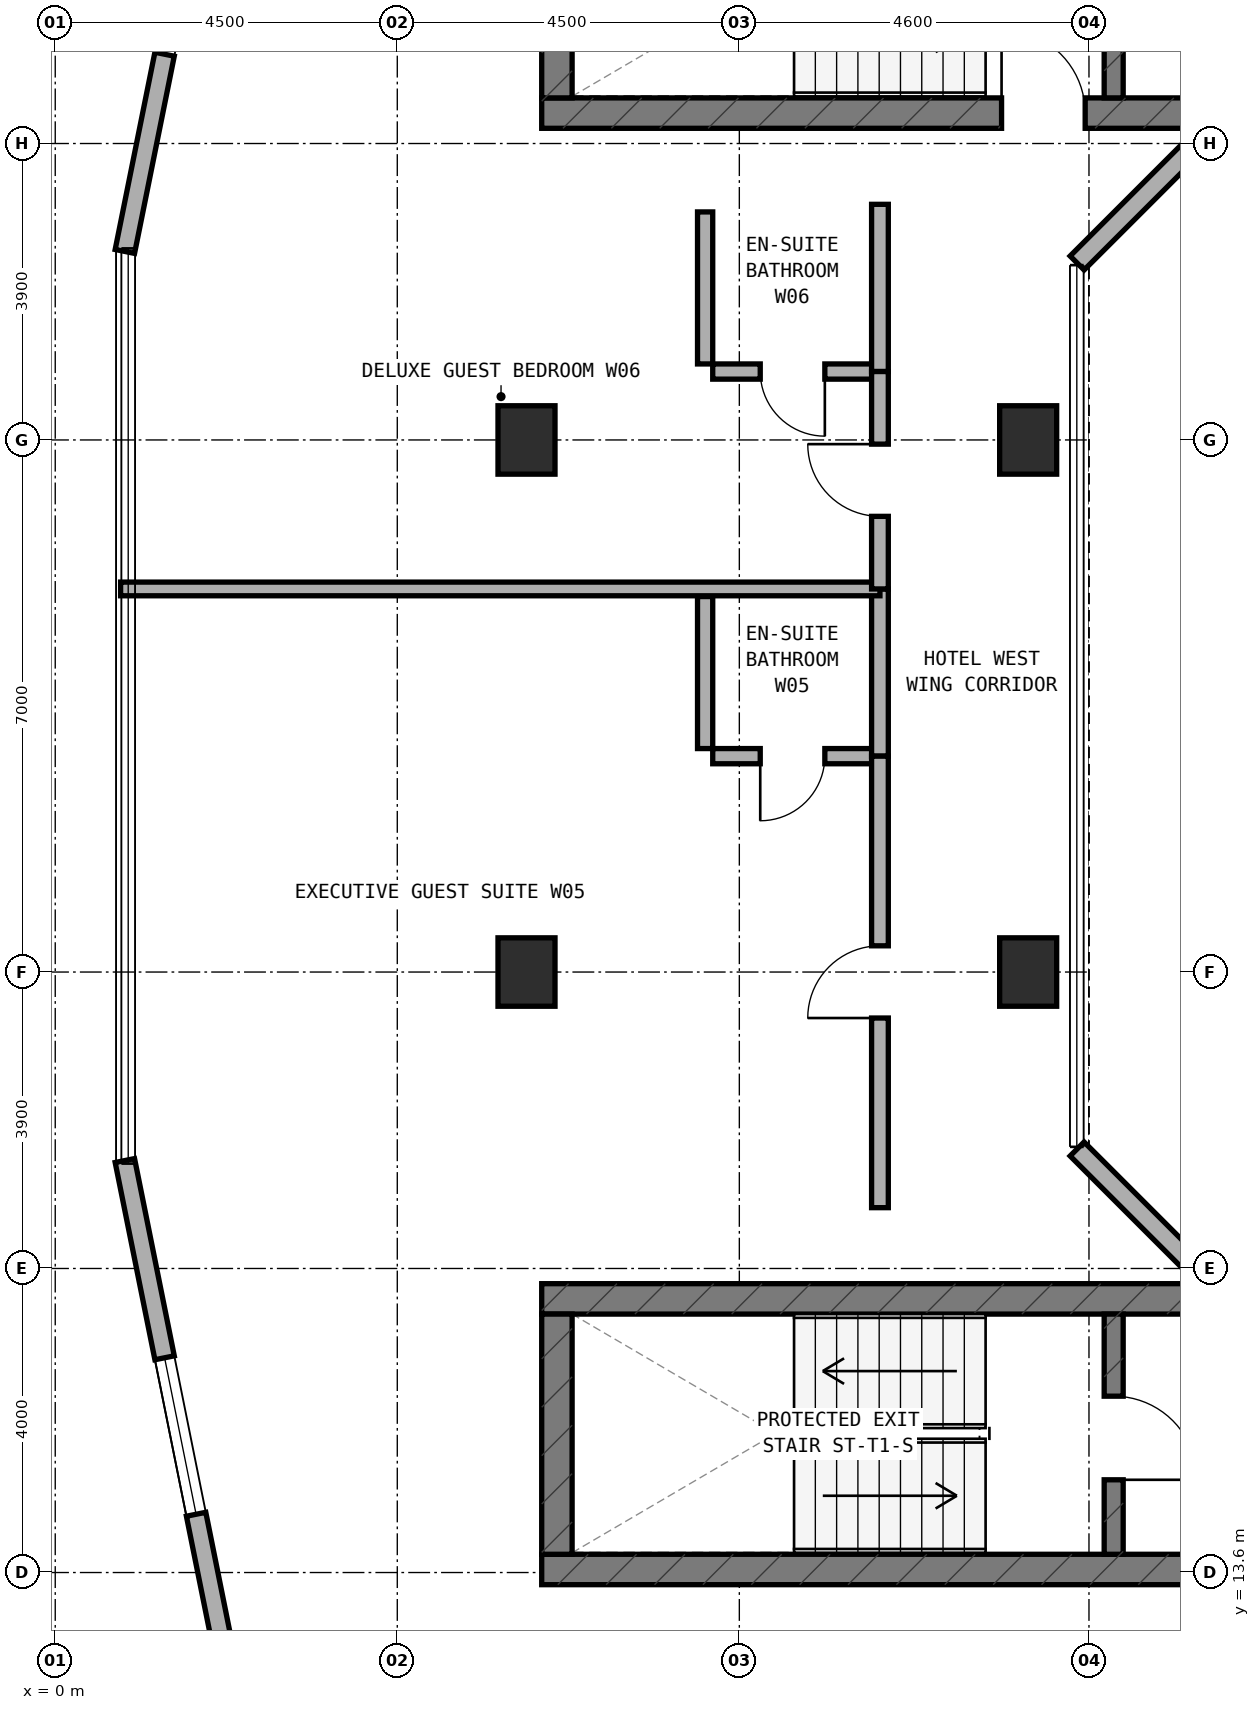
"""IFC4 building model, lengths in metres.
Left out: names, types, materials, properties, quantities, classifications, styles, units other than length and angle.
Written with IfcOpenShell. Run it as: python <this file> out.ifc"""

import sys

from ifc_helpers import new_model, si_unit, direction, frame, frame_2d, origin, origin_2d, place, context, subcontext, project, spatial, rectangle, extrude, element, fill, save


model = new_model("IFC4")
c1 = context("Model", 3, precision=1e-05, world=origin(), true_north=direction((0.0, 1.0)))
c2 = subcontext(c1, "Body", "Model", "MODEL_VIEW")
j1 = project(units=[si_unit("LENGTHUNIT", "METRE"), si_unit("PLANEANGLEUNIT", "RADIAN")], contexts=[c1])
p1 = place(None, origin())
s1 = spatial("IfcSite", under=j1, at=p1, CompositionType="ELEMENT")
p2 = place(p1, origin())
s2 = spatial("IfcBuilding", under=s1, at=p2, CompositionType="ELEMENT")
p3 = place(p2, frame((0.0, 0.0, 169.5)))
s3 = spatial("IfcBuildingStorey", under=s2, at=p3, CompositionType="ELEMENT", Elevation=169.5)
p4 = place(p3, frame((6.4, 32.8, 0.0), z_axis=(0.0, 0.0, 1.0), x_axis=(1.0, 0.0, 0.0)))
e1 = element("IfcWall", 1, at=p4, inside=s3, PredefinedType="SHEAR", context=c2, shape_type="SweptSolid", body=[
    extrude(rectangle(XDim=24.4, YDim=0.4, at=frame_2d((12.2, 0.0))), origin(), (0.0, 0.0, 1.0), 3.5),
])
p5 = place(p4, frame((6.05, 0.0, 0.0)))
e2 = element("IfcOpeningElement", 2, at=p5, cuts=e1, PredefinedType="OPENING", context=c2, shape_type="SweptSolid", body=[
    extrude(rectangle(XDim=1.1, YDim=2.15, at=frame_2d((0.55, 1.075))), frame((0.0, 0.21, 0.0), z_axis=(0.0, -1.0, 0.0), x_axis=(1.0, 0.0, 0.0)), (0.0, 0.0, 1.0), 0.42),
])
p6 = place(p3, frame((6.6, 33.0, 0.0), z_axis=(0.0, 0.0, 1.0), x_axis=(0.0, 1.0, 0.0)))
e3 = element("IfcWall", 3, at=p6, inside=s3, PredefinedType="SHEAR", context=c2, shape_type="SweptSolid", body=[
    extrude(rectangle(XDim=3.16, YDim=0.4, at=frame_2d((1.58, 0.0))), origin(), (0.0, 0.0, 1.0), 3.5),
])
p7 = place(p3, frame((13.925, 33.0, 0.0), z_axis=(0.0, 0.0, 1.0), x_axis=(0.0, 1.0, 0.0)))
e4 = element("IfcWall", 4, at=p7, inside=s3, PredefinedType="STANDARD", context=c2, shape_type="SweptSolid", body=[
    extrude(rectangle(XDim=3.16, YDim=0.25, at=frame_2d((1.58, 0.0))), origin(), (0.0, 0.0, 1.0), 3.18),
])
p8 = place(p7, frame((0.98, 0.0, 0.0)))
e5 = element("IfcOpeningElement", 5, at=p8, cuts=e4, PredefinedType="OPENING", context=c2, shape_type="SweptSolid", body=[
    extrude(rectangle(XDim=1.1, YDim=2.15, at=frame_2d((0.55, 1.075))), frame((0.0, 0.135, 0.0), z_axis=(0.0, -1.0, 0.0), x_axis=(1.0, 0.0, 0.0)), (0.0, 0.0, 1.0), 0.27),
])
p9 = place(p3, frame((6.4, 13.64, 0.0), z_axis=(0.0, 0.0, 1.0), x_axis=(1.0, 0.0, 0.0)))
e6 = element("IfcWall", 6, at=p9, inside=s3, PredefinedType="SHEAR", context=c2, shape_type="SweptSolid", body=[
    extrude(rectangle(XDim=24.4, YDim=0.4, at=frame_2d((12.2, 0.0))), origin(), (0.0, 0.0, 1.0), 3.5),
])
p10 = place(p9, frame((9.15, 0.0, 0.0)))
e7 = element("IfcOpeningElement", 7, at=p10, cuts=e6, PredefinedType="OPENING", context=c2, shape_type="SweptSolid", body=[
    extrude(rectangle(XDim=1.2, YDim=2.15, at=frame_2d((0.6, 1.075))), frame((0.0, 0.21, 0.0), z_axis=(0.0, -1.0, 0.0), x_axis=(1.0, 0.0, 0.0)), (0.0, 0.0, 1.0), 0.42),
])
p11 = place(p9, frame((16.94, 0.0, 0.0)))
e8 = element("IfcOpeningElement", 8, at=p11, cuts=e6, PredefinedType="OPENING", context=c2, shape_type="SweptSolid", body=[
    extrude(rectangle(XDim=0.85, YDim=2.1, at=frame_2d((0.425, 1.05))), frame((0.0, 0.21, 0.0), z_axis=(0.0, -1.0, 0.0), x_axis=(1.0, 0.0, 0.0)), (0.0, 0.0, 1.0), 0.42),
])
p12 = place(p9, frame((18.783, 0.0, 0.0)))
e9 = element("IfcOpeningElement", 9, at=p12, cuts=e6, PredefinedType="OPENING", context=c2, shape_type="SweptSolid", body=[
    extrude(rectangle(XDim=1.1, YDim=2.15, at=frame_2d((0.55, 1.075))), frame((0.0, 0.21, 0.0), z_axis=(0.0, -1.0, 0.0), x_axis=(1.0, 0.0, 0.0)), (0.0, 0.0, 1.0), 0.42),
])
p13 = place(p9, frame((20.65, 0.0, 0.0)))
e10 = element("IfcOpeningElement", 10, at=p13, cuts=e6, PredefinedType="OPENING", context=c2, shape_type="SweptSolid", body=[
    extrude(rectangle(XDim=1.1, YDim=2.15, at=frame_2d((0.55, 1.075))), frame((0.0, 0.21, 0.0), z_axis=(0.0, -1.0, 0.0), x_axis=(1.0, 0.0, 0.0)), (0.0, 0.0, 1.0), 0.42),
])
p14 = place(p9, frame((22.517, 0.0, 0.0)))
e11 = element("IfcOpeningElement", 11, at=p14, cuts=e6, PredefinedType="OPENING", context=c2, shape_type="SweptSolid", body=[
    extrude(rectangle(XDim=1.1, YDim=2.15, at=frame_2d((0.55, 1.075))), frame((0.0, 0.21, 0.0), z_axis=(0.0, -1.0, 0.0), x_axis=(1.0, 0.0, 0.0)), (0.0, 0.0, 1.0), 0.42),
])
p15 = place(p3, frame((6.4, 17.2, 0.0), z_axis=(0.0, 0.0, 1.0), x_axis=(1.0, 0.0, 0.0)))
e12 = element("IfcWall", 12, at=p15, inside=s3, PredefinedType="SHEAR", context=c2, shape_type="SweptSolid", body=[
    extrude(rectangle(XDim=24.4, YDim=0.4, at=frame_2d((12.2, 0.0))), origin(), (0.0, 0.0, 1.0), 3.5),
])
p16 = place(p3, frame((6.6, 13.84, 0.0), z_axis=(0.0, 0.0, 1.0), x_axis=(0.0, 1.0, 0.0)))
e13 = element("IfcWall", 13, at=p16, inside=s3, PredefinedType="SHEAR", context=c2, shape_type="SweptSolid", body=[
    extrude(rectangle(XDim=3.16, YDim=0.4, at=frame_2d((1.58, 0.0))), origin(), (0.0, 0.0, 1.0), 3.5),
])
p17 = place(p3, frame((13.925, 13.84, 0.0), z_axis=(0.0, 0.0, 1.0), x_axis=(0.0, 1.0, 0.0)))
e14 = element("IfcWall", 14, at=p17, inside=s3, PredefinedType="STANDARD", context=c2, shape_type="SweptSolid", body=[
    extrude(rectangle(XDim=3.16, YDim=0.25, at=frame_2d((1.58, 0.0))), origin(), (0.0, 0.0, 1.0), 3.18),
])
p18 = place(p17, frame((0.98, 0.0, 0.0)))
e15 = element("IfcOpeningElement", 15, at=p18, cuts=e14, PredefinedType="OPENING", context=c2, shape_type="SweptSolid", body=[
    extrude(rectangle(XDim=1.1, YDim=2.15, at=frame_2d((0.55, 1.075))), frame((0.0, 0.135, 0.0), z_axis=(0.0, -1.0, 0.0), x_axis=(1.0, 0.0, 0.0)), (0.0, 0.0, 1.0), 0.27),
])
for number, where, z_axis, x_axis in (
    (16, (6.2, 21.5, 0.0), (0.0, 0.0, 1.0), (1.0, 0.0, 0.0)),
    (17, (6.2, 28.5, 0.0), (0.0, 0.0, 1.0), (1.0, 0.0, 0.0)),
    (18, (12.8, 21.5, 0.0), (0.0, 0.0, 1.0), (1.0, 0.0, 0.0)),
    (19, (12.8, 28.5, 0.0), (0.0, 0.0, 1.0), (1.0, 0.0, 0.0)),
):
    element("IfcColumn", number, at=place(p3, frame(where, z_axis=z_axis, x_axis=x_axis)), inside=s3, PredefinedType="COLUMN", context=c2, shape_type="SweptSolid", body=[
        extrude(rectangle(XDim=0.75, YDim=0.9, at=origin_2d()), origin(), (0.0, 0.0, 1.0), 3.5),
    ])
p19 = place(p3, frame((2.729, 39.982, 0.0), z_axis=(0.0, 0.0, 1.0), x_axis=(-0.197435082048, -0.980315963543, 0.0)))
e20 = element("IfcWall", 20, at=p19, inside=s3, PredefinedType="STANDARD", context=c2, shape_type="SweptSolid", body=[
    extrude(rectangle(XDim=9.183, YDim=0.26, at=frame_2d((4.591, 0.0))), origin(), (0.0, 0.0, 1.0), 3.18),
])
p20 = place(p19, frame((4.436, 0.0, 0.85)))
e21 = element("IfcOpeningElement", 21, at=p20, cuts=e20, PredefinedType="OPENING", context=c2, shape_type="SweptSolid", body=[
    extrude(rectangle(XDim=2.1, YDim=1.5, at=frame_2d((1.05, 0.75))), frame((0.0, 0.14, 0.0), z_axis=(0.0, -1.0, 0.0), x_axis=(1.0, 0.0, 0.0)), (0.0, 0.0, 1.0), 0.28),
])
p21 = place(p3, frame((0.916, 19.02, 0.0), z_axis=(0.0, 0.0, 1.0), x_axis=(0.197435082048, -0.980315963543, 0.0)))
e22 = element("IfcWall", 22, at=p21, inside=s3, PredefinedType="STANDARD", context=c2, shape_type="SweptSolid", body=[
    extrude(rectangle(XDim=9.183, YDim=0.26, at=frame_2d((4.591, 0.0))), origin(), (0.0, 0.0, 1.0), 3.18),
])
p22 = place(p21, frame((2.647, 0.0, 0.85)))
e23 = element("IfcOpeningElement", 23, at=p22, cuts=e22, PredefinedType="OPENING", context=c2, shape_type="SweptSolid", body=[
    extrude(rectangle(XDim=2.1, YDim=1.5, at=frame_2d((1.05, 0.75))), frame((0.0, 0.14, 0.0), z_axis=(0.0, -1.0, 0.0), x_axis=(1.0, 0.0, 0.0)), (0.0, 0.0, 1.0), 0.28),
])
for number, where, z_axis, x_axis in (
    (24, (15.278, 32.662, 0.0), (0.0, 0.0, 1.0), (-0.707, -0.707, 0.0)),
    (25, (13.444, 19.172, 0.0), (0.0, 0.0, 1.0), (0.707, -0.707, 0.0)),
):
    element("IfcWall", number, at=place(p3, frame(where, z_axis=z_axis, x_axis=x_axis)), inside=s3, PredefinedType="STANDARD", context=c2, shape_type="SweptSolid", body=[
        extrude(rectangle(XDim=2.594, YDim=0.26, at=frame_2d((1.297, 0.0))), origin(), (0.0, 0.0, 1.0), 3.18),
    ])
p23 = place(p3, frame((8.65, 24.34, 0.0), z_axis=(0.0, 0.0, 1.0), x_axis=(1.0, 0.0, 0.0)))
e26 = element("IfcWall", 26, at=p23, inside=s3, PredefinedType="PLUMBINGWALL", context=c2, shape_type="SweptSolid", body=[
    extrude(rectangle(XDim=2.1, YDim=0.2, at=frame_2d((1.05, 0.0))), origin(), (0.0, 0.0, 1.0), 3.18),
])
p24 = place(p23, frame((0.625, 0.0, 0.0)))
e27 = element("IfcOpeningElement", 27, at=p24, cuts=e26, PredefinedType="OPENING", context=c2, shape_type="SweptSolid", body=[
    extrude(rectangle(XDim=0.85, YDim=2.1, at=frame_2d((0.425, 1.05))), frame((0.0, 0.11, 0.0), z_axis=(0.0, -1.0, 0.0), x_axis=(1.0, 0.0, 0.0)), (0.0, 0.0, 1.0), 0.22),
])
p25 = place(p3, frame((8.55, 24.44, 0.0), z_axis=(0.0, 0.0, 1.0), x_axis=(0.0, 1.0, 0.0)))
e28 = element("IfcWall", 28, at=p25, inside=s3, PredefinedType="PLUMBINGWALL", context=c2, shape_type="SweptSolid", body=[
    extrude(rectangle(XDim=2.0, YDim=0.2, at=frame_2d((1.0, 0.0))), origin(), (0.0, 0.0, 1.0), 3.18),
])
p26 = place(p3, frame((10.85, 24.34, 0.0), z_axis=(0.0, 0.0, 1.0), x_axis=(0.0, 1.0, 0.0)))
e29 = element("IfcWall", 29, at=p26, inside=s3, PredefinedType="SOLIDWALL", context=c2, shape_type="SweptSolid", body=[
    extrude(rectangle(XDim=2.2, YDim=0.22, at=frame_2d((1.1, 0.0))), origin(), (0.0, 0.0, 1.0), 3.18),
])
p27 = place(p3, frame((10.85, 18.4, 0.0), z_axis=(0.0, 0.0, 1.0), x_axis=(0.0, 1.0, 0.0)))
e30 = element("IfcWall", 30, at=p27, inside=s3, PredefinedType="SOLIDWALL", context=c2, shape_type="SweptSolid", body=[
    extrude(rectangle(XDim=5.94, YDim=0.22, at=frame_2d((2.97, 0.0))), origin(), (0.0, 0.0, 1.0), 2.855),
])
p28 = place(p27, frame((2.495, 0.0, 0.0)))
e31 = element("IfcOpeningElement", 31, at=p28, cuts=e30, PredefinedType="OPENING", context=c2, shape_type="SweptSolid", body=[
    extrude(rectangle(XDim=0.95, YDim=2.1, at=frame_2d((0.475, 1.05))), frame((0.0, 0.12, 0.0), z_axis=(0.0, -1.0, 0.0), x_axis=(1.0, 0.0, 0.0)), (0.0, 0.0, 1.0), 0.24),
])
p29 = place(p3, frame((0.86, 26.54, 0.0), z_axis=(0.0, 0.0, 1.0), x_axis=(1.0, 0.0, 0.0)))
e32 = element("IfcWall", 32, at=p29, inside=s3, PredefinedType="SOLIDWALL", context=c2, shape_type="SweptSolid", body=[
    extrude(rectangle(XDim=9.99, YDim=0.18, at=frame_2d((4.995, 0.0))), origin(), (0.0, 0.0, 1.0), 2.795),
])
p30 = place(p3, frame((8.65, 29.4, 0.0), z_axis=(0.0, 0.0, 1.0), x_axis=(1.0, 0.0, 0.0)))
e33 = element("IfcWall", 33, at=p30, inside=s3, PredefinedType="PLUMBINGWALL", context=c2, shape_type="SweptSolid", body=[
    extrude(rectangle(XDim=2.1, YDim=0.2, at=frame_2d((1.05, 0.0))), origin(), (0.0, 0.0, 1.0), 3.18),
])
p31 = place(p30, frame((0.625, 0.0, 0.0)))
e34 = element("IfcOpeningElement", 34, at=p31, cuts=e33, PredefinedType="OPENING", context=c2, shape_type="SweptSolid", body=[
    extrude(rectangle(XDim=0.85, YDim=2.1, at=frame_2d((0.425, 1.05))), frame((0.0, 0.11, 0.0), z_axis=(0.0, -1.0, 0.0), x_axis=(1.0, 0.0, 0.0)), (0.0, 0.0, 1.0), 0.22),
])
p32 = place(p3, frame((8.55, 29.5, 0.0), z_axis=(0.0, 0.0, 1.0), x_axis=(0.0, 1.0, 0.0)))
e35 = element("IfcWall", 35, at=p32, inside=s3, PredefinedType="PLUMBINGWALL", context=c2, shape_type="SweptSolid", body=[
    extrude(rectangle(XDim=2.0, YDim=0.2, at=frame_2d((1.0, 0.0))), origin(), (0.0, 0.0, 1.0), 3.18),
])
p33 = place(p3, frame((10.85, 29.4, 0.0), z_axis=(0.0, 0.0, 1.0), x_axis=(0.0, 1.0, 0.0)))
e36 = element("IfcWall", 36, at=p33, inside=s3, PredefinedType="SOLIDWALL", context=c2, shape_type="SweptSolid", body=[
    extrude(rectangle(XDim=2.2, YDim=0.22, at=frame_2d((1.1, 0.0))), origin(), (0.0, 0.0, 1.0), 3.18),
])
p34 = place(p3, frame((10.85, 26.54, 0.0), z_axis=(0.0, 0.0, 1.0), x_axis=(0.0, 1.0, 0.0)))
e37 = element("IfcWall", 37, at=p34, inside=s3, PredefinedType="SOLIDWALL", context=c2, shape_type="SweptSolid", body=[
    extrude(rectangle(XDim=2.86, YDim=0.22, at=frame_2d((1.43, 0.0))), origin(), (0.0, 0.0, 1.0), 2.855),
])
p35 = place(p34, frame((0.955, 0.0, 0.0)))
e38 = element("IfcOpeningElement", 38, at=p35, cuts=e37, PredefinedType="OPENING", context=c2, shape_type="SweptSolid", body=[
    extrude(rectangle(XDim=0.95, YDim=2.1, at=frame_2d((0.475, 1.05))), frame((0.0, 0.12, 0.0), z_axis=(0.0, -1.0, 0.0), x_axis=(1.0, 0.0, 0.0)), (0.0, 0.0, 1.0), 0.24),
])
p36 = place(p20, origin())
e39 = element("IfcWindow", 39, at=p36, inside=s3, PartitioningType="SINGLE_PANEL", PredefinedType="WINDOW", context=c2, shape_type="SweptSolid", body=[
    extrude(rectangle(XDim=2.1, YDim=1.5, at=frame_2d((1.05, 0.75))), frame((0.0, 0.03, 0.0), z_axis=(0.0, -1.0, 0.0), x_axis=(1.0, 0.0, 0.0)), (0.0, 0.0, 1.0), 0.06),
])
fill(e21, e39)
p37 = place(p22, origin())
e40 = element("IfcWindow", 40, at=p37, inside=s3, PartitioningType="SINGLE_PANEL", PredefinedType="WINDOW", context=c2, shape_type="SweptSolid", body=[
    extrude(rectangle(XDim=2.1, YDim=1.5, at=frame_2d((1.05, 0.75))), frame((0.0, 0.03, 0.0), z_axis=(0.0, -1.0, 0.0), x_axis=(1.0, 0.0, 0.0)), (0.0, 0.0, 1.0), 0.06),
])
fill(e23, e40)
p38 = place(p18, frame((1.1, 0.0, 0.0), z_axis=(0.0, 0.0, 1.0), x_axis=(-1.0, 0.0, 0.0)))
e41 = element("IfcDoor", 41, at=p38, inside=s3, OperationType="SINGLE_SWING_RIGHT", PredefinedType="DOOR", context=c2, shape_type="SweptSolid", body=[
    extrude(rectangle(XDim=1.1, YDim=2.15, at=frame_2d((0.55, 1.075))), frame((0.0, 0.025, 0.0), z_axis=(0.0, -1.0, 0.0), x_axis=(1.0, 0.0, 0.0)), (0.0, 0.0, 1.0), 0.05),
])
fill(e15, e41)
p39 = place(p5, origin())
e42 = element("IfcDoor", 42, at=p39, inside=s3, OperationType="SINGLE_SWING_LEFT", PredefinedType="DOOR", context=c2, shape_type="SweptSolid", body=[
    extrude(rectangle(XDim=1.1, YDim=2.15, at=frame_2d((0.55, 1.075))), frame((0.0, 0.025, 0.0), z_axis=(0.0, -1.0, 0.0), x_axis=(1.0, 0.0, 0.0)), (0.0, 0.0, 1.0), 0.05),
])
fill(e2, e42)
p40 = place(p24, frame((0.85, 0.0, 0.0), z_axis=(0.0, 0.0, 1.0), x_axis=(-1.0, 0.0, 0.0)))
e43 = element("IfcDoor", 43, at=p40, inside=s3, OperationType="SINGLE_SWING_RIGHT", PredefinedType="DOOR", context=c2, shape_type="SweptSolid", body=[
    extrude(rectangle(XDim=0.85, YDim=2.1, at=frame_2d((0.425, 1.05))), frame((0.0, 0.025, 0.0), z_axis=(0.0, -1.0, 0.0), x_axis=(1.0, 0.0, 0.0)), (0.0, 0.0, 1.0), 0.05),
])
fill(e27, e43)
p41 = place(p28, origin())
e44 = element("IfcDoor", 44, at=p41, inside=s3, OperationType="SINGLE_SWING_LEFT", PredefinedType="DOOR", context=c2, shape_type="SweptSolid", body=[
    extrude(rectangle(XDim=0.95, YDim=2.1, at=frame_2d((0.475, 1.05))), frame((0.0, 0.025, 0.0), z_axis=(0.0, -1.0, 0.0), x_axis=(1.0, 0.0, 0.0)), (0.0, 0.0, 1.0), 0.05),
])
fill(e31, e44)
p42 = place(p31, frame((0.85, 0.0, 0.0), z_axis=(0.0, 0.0, 1.0), x_axis=(-1.0, 0.0, 0.0)))
e45 = element("IfcDoor", 45, at=p42, inside=s3, OperationType="SINGLE_SWING_LEFT", PredefinedType="DOOR", context=c2, shape_type="SweptSolid", body=[
    extrude(rectangle(XDim=0.85, YDim=2.1, at=frame_2d((0.425, 1.05))), frame((0.0, 0.025, 0.0), z_axis=(0.0, -1.0, 0.0), x_axis=(1.0, 0.0, 0.0)), (0.0, 0.0, 1.0), 0.05),
])
fill(e34, e45)
p43 = place(p35, origin())
e46 = element("IfcDoor", 46, at=p43, inside=s3, OperationType="SINGLE_SWING_RIGHT", PredefinedType="DOOR", context=c2, shape_type="SweptSolid", body=[
    extrude(rectangle(XDim=0.95, YDim=2.1, at=frame_2d((0.475, 1.05))), frame((0.0, 0.025, 0.0), z_axis=(0.0, -1.0, 0.0), x_axis=(1.0, 0.0, 0.0)), (0.0, 0.0, 1.0), 0.05),
])
fill(e38, e46)
save(model, sys.argv[1])
